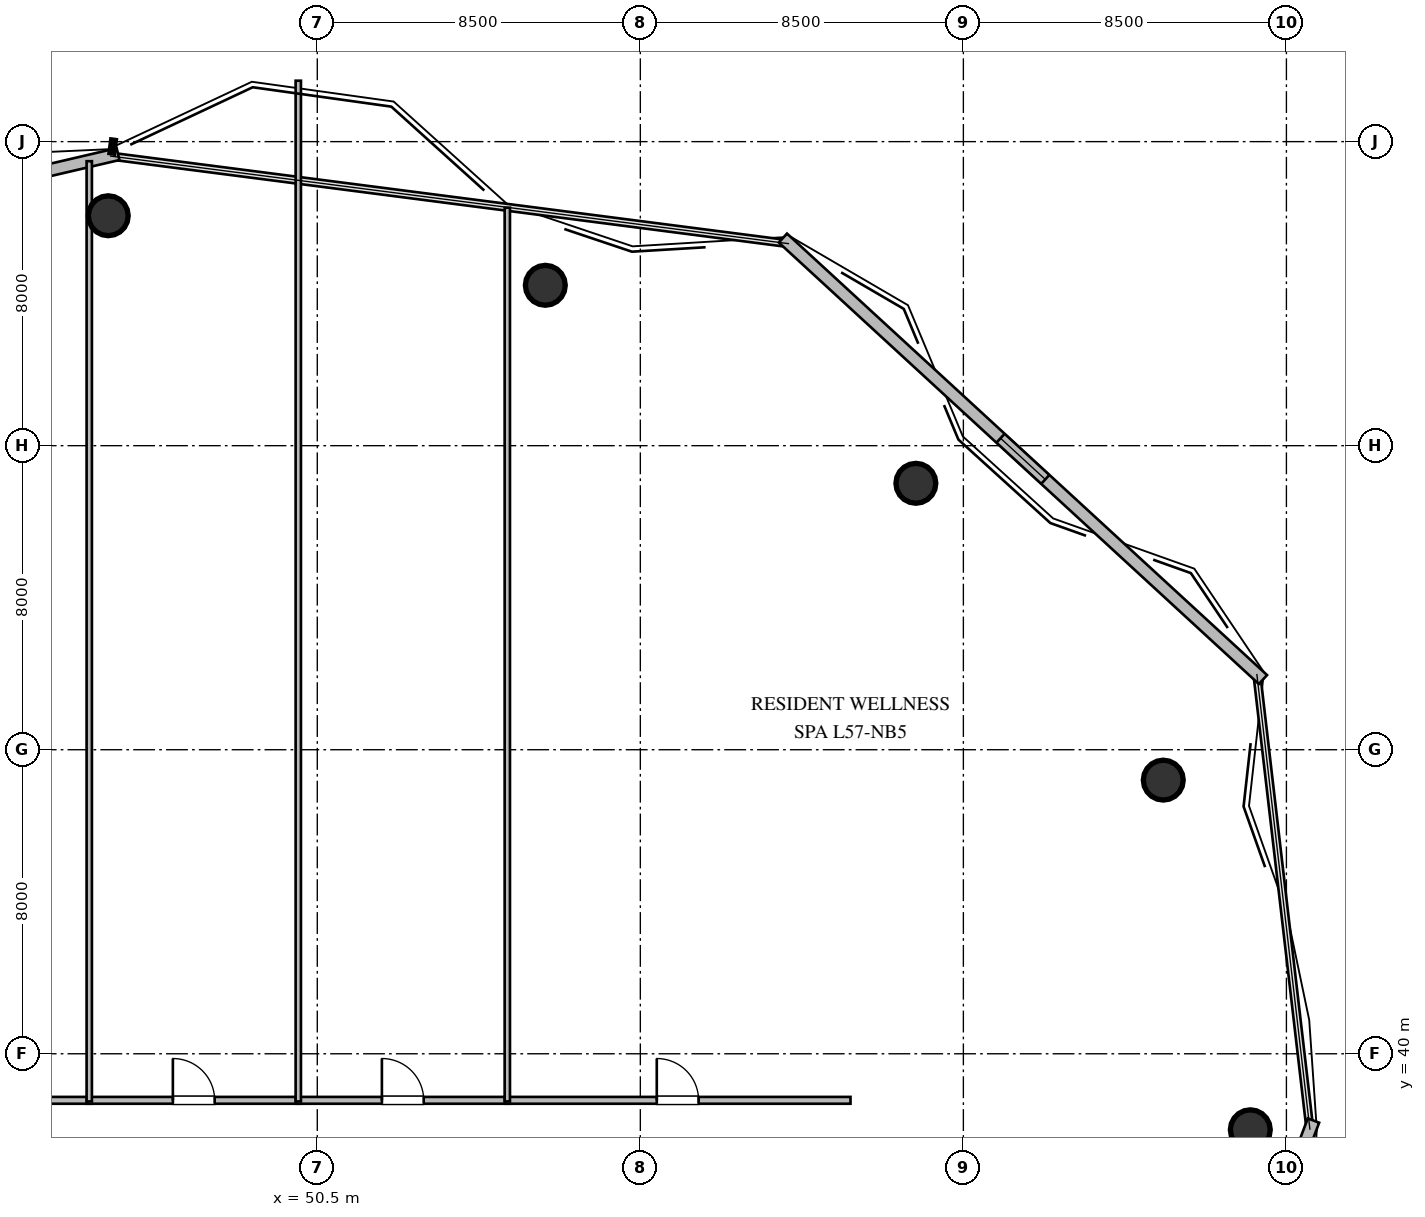
"""IFC4 building model, lengths in metres.
Left out: names, types, materials, properties, quantities, classifications, styles, units other than length and angle.
Written with IfcOpenShell. Run it as: python <this file> out.ifc"""

import sys

from ifc_helpers import new_model, si_unit, direction, frame, frame_2d, origin, origin_2d, place, context, subcontext, project, spatial, rectangle, circle, extrude, element, fill, save


model = new_model("IFC4")
c1 = context("Model", 3, precision=1e-05, world=origin(), true_north=direction((0.0, 1.0)))
c2 = subcontext(c1, "Body", "Model", "MODEL_VIEW")
j1 = project(units=[si_unit("LENGTHUNIT", "METRE"), si_unit("PLANEANGLEUNIT", "RADIAN")], contexts=[c1])
p1 = place(None, origin())
s1 = spatial("IfcSite", under=j1, at=p1, CompositionType="ELEMENT")
p2 = place(p1, origin())
s2 = spatial("IfcBuilding", under=s1, at=p2, CompositionType="ELEMENT")
p3 = place(p2, frame((0.0, 0.0, 217.2)))
s3 = spatial("IfcBuildingStorey", under=s2, at=p3, CompositionType="ELEMENT", Elevation=217.2)
for number, where, z_axis, x_axis in (
    (1, (75.05, 38.0, 0.0), (0.0, 0.0, 1.0), (1.0, 0.0, 0.0)),
    (2, (72.76, 47.2, 0.0), (0.0, 0.0, 1.0), (1.0, 0.0, 0.0)),
    (3, (66.25, 55.01, 0.0), (0.0, 0.0, 1.0), (1.0, 0.0, 0.0)),
    (4, (56.5, 60.22, 0.0), (0.0, 0.0, 1.0), (1.0, 0.0, 0.0)),
    (5, (45.0, 62.05, 0.0), (0.0, 0.0, 1.0), (1.0, 0.0, 0.0)),
):
    element("IfcColumn", number, at=place(p3, frame(where, z_axis=z_axis, x_axis=x_axis)), inside=s3, PredefinedType="COLUMN", context=c2, shape_type="SweptSolid", body=[
        extrude(circle(Radius=0.525, at=origin_2d()), origin(), (0.0, 0.0, 1.0), 3.6),
    ])
p4 = place(p3, frame((76.712, 38.243, 0.0), z_axis=(0.0, 0.0, 1.0), x_axis=(-0.353659523244, -0.935374225441, 0.0)))
e6 = element("IfcWall", 6, at=p4, inside=s3, PredefinedType="STANDARD", context=c2, shape_type="SweptSolid", body=[
    extrude(rectangle(XDim=14.172, YDim=0.32, at=frame_2d((7.086, 0.0))), origin(), (0.0, 0.0, 1.0), 3.36),
])
p5 = place(p3, frame((27.909, 59.617, 0.0), z_axis=(0.0, 0.0, 1.0), x_axis=(0.973753606594, 0.227604731158, 0.0)))
e7 = element("IfcWall", 7, at=p5, inside=s3, PredefinedType="STANDARD", context=c2, shape_type="SweptSolid", body=[
    extrude(rectangle(XDim=17.817, YDim=0.32, at=frame_2d((8.908, 0.0))), origin(), (0.0, 0.0, 1.0), 3.36),
])
p6 = place(p5, frame((8.109, 0.0, 1.05)))
e8 = element("IfcOpeningElement", 8, at=p6, cuts=e7, PredefinedType="OPENING", context=c2, shape_type="SweptSolid", body=[
    extrude(rectangle(XDim=1.6, YDim=1.5, at=frame_2d((0.8, 0.75))), frame((0.0, 0.17, 0.0), z_axis=(0.0, -1.0, 0.0), x_axis=(1.0, 0.0, 0.0)), (0.0, 0.0, 1.0), 0.34),
])
p7 = place(p3, frame((62.751, 61.463, 0.0), z_axis=(0.0, 0.0, 1.0), x_axis=(0.736063690764, -0.676912286149, 0.0)))
e9 = element("IfcWall", 9, at=p7, inside=s3, PredefinedType="STANDARD", context=c2, shape_type="SweptSolid", body=[
    extrude(rectangle(XDim=17.162, YDim=0.32, at=frame_2d((8.581, 0.0))), origin(), (0.0, 0.0, 1.0), 3.36),
])
p8 = place(p7, frame((7.781, 0.0, 1.05)))
e10 = element("IfcOpeningElement", 10, at=p8, cuts=e9, PredefinedType="OPENING", context=c2, shape_type="SweptSolid", body=[
    extrude(rectangle(XDim=1.6, YDim=1.5, at=frame_2d((0.8, 0.75))), frame((0.0, 0.17, 0.0), z_axis=(0.0, -1.0, 0.0), x_axis=(1.0, 0.0, 0.0)), (0.0, 0.0, 1.0), 0.34),
])
p9 = place(p3, frame((39.185, 38.775, 0.0), z_axis=(0.0, 0.0, 1.0), x_axis=(1.0, 0.0, 0.0)))
e11 = element("IfcWall", 11, at=p9, inside=s3, PredefinedType="PARTITIONING", context=c2, shape_type="SweptSolid", body=[
    extrude(rectangle(XDim=5.38, YDim=0.18, at=frame_2d((2.69, 0.0))), origin(), (0.0, 0.0, 1.0), 3.36),
])
p10 = place(p9, frame((2.14, 0.0, 0.0)))
e12 = element("IfcOpeningElement", 12, at=p10, cuts=e11, PredefinedType="OPENING", context=c2, shape_type="SweptSolid", body=[
    extrude(rectangle(XDim=1.1, YDim=2.1, at=frame_2d((0.55, 1.05))), frame((0.0, 0.1, 0.0), z_axis=(0.0, -1.0, 0.0), x_axis=(1.0, 0.0, 0.0)), (0.0, 0.0, 1.0), 0.2),
])
p11 = place(p3, frame((44.435, 38.775, 0.0), z_axis=(0.0, 0.0, 1.0), x_axis=(1.0, 0.0, 0.0)))
e13 = element("IfcWall", 13, at=p11, inside=s3, PredefinedType="PARTITIONING", context=c2, shape_type="SweptSolid", body=[
    extrude(rectangle(XDim=5.63, YDim=0.18, at=frame_2d((2.815, 0.0))), origin(), (0.0, 0.0, 1.0), 3.36),
])
p12 = place(p11, frame((2.265, 0.0, 0.0)))
e14 = element("IfcOpeningElement", 14, at=p12, cuts=e13, PredefinedType="OPENING", context=c2, shape_type="SweptSolid", body=[
    extrude(rectangle(XDim=1.1, YDim=2.1, at=frame_2d((0.55, 1.05))), frame((0.0, 0.1, 0.0), z_axis=(0.0, -1.0, 0.0), x_axis=(1.0, 0.0, 0.0)), (0.0, 0.0, 1.0), 0.2),
])
p13 = place(p3, frame((49.935, 38.775, 0.0), z_axis=(0.0, 0.0, 1.0), x_axis=(1.0, 0.0, 0.0)))
e15 = element("IfcWall", 15, at=p13, inside=s3, PredefinedType="PARTITIONING", context=c2, shape_type="SweptSolid", body=[
    extrude(rectangle(XDim=5.63, YDim=0.18, at=frame_2d((2.815, 0.0))), origin(), (0.0, 0.0, 1.0), 3.36),
])
p14 = place(p13, frame((2.265, 0.0, 0.0)))
e16 = element("IfcOpeningElement", 16, at=p14, cuts=e15, PredefinedType="OPENING", context=c2, shape_type="SweptSolid", body=[
    extrude(rectangle(XDim=1.1, YDim=2.1, at=frame_2d((0.55, 1.05))), frame((0.0, 0.1, 0.0), z_axis=(0.0, -1.0, 0.0), x_axis=(1.0, 0.0, 0.0)), (0.0, 0.0, 1.0), 0.2),
])
p15 = place(p3, frame((55.435, 38.775, 0.0), z_axis=(0.0, 0.0, 1.0), x_axis=(1.0, 0.0, 0.0)))
e17 = element("IfcWall", 17, at=p15, inside=s3, PredefinedType="PARTITIONING", context=c2, shape_type="SweptSolid", body=[
    extrude(rectangle(XDim=9.095, YDim=0.18, at=frame_2d((4.547, 0.0))), origin(), (0.0, 0.0, 1.0), 3.36),
])
p16 = place(p15, frame((3.998, 0.0, 0.0)))
e18 = element("IfcOpeningElement", 18, at=p16, cuts=e17, PredefinedType="OPENING", context=c2, shape_type="SweptSolid", body=[
    extrude(rectangle(XDim=1.1, YDim=2.1, at=frame_2d((0.55, 1.05))), frame((0.0, 0.1, 0.0), z_axis=(0.0, -1.0, 0.0), x_axis=(1.0, 0.0, 0.0)), (0.0, 0.0, 1.0), 0.2),
])
p17 = place(p3, frame((44.5, 63.485, 0.0), z_axis=(0.0, 0.0, 1.0), x_axis=(0.0, -1.0, 0.0)))
e19 = element("IfcWall", 19, at=p17, inside=s3, PredefinedType="PARTITIONING", context=c2, shape_type="SweptSolid", body=[
    extrude(rectangle(XDim=24.74, YDim=0.14, at=frame_2d((12.37, 0.0))), origin(), (0.0, 0.0, 1.0), 2.89),
])
p18 = place(p3, frame((50.0, 65.603, 0.0), z_axis=(0.0, 0.0, 1.0), x_axis=(0.0, -1.0, 0.0)))
e20 = element("IfcWall", 20, at=p18, inside=s3, PredefinedType="PARTITIONING", context=c2, shape_type="SweptSolid", body=[
    extrude(rectangle(XDim=26.858, YDim=0.14, at=frame_2d((13.429, 0.0))), origin(), (0.0, 0.0, 1.0), 3.36),
])
p19 = place(p3, frame((55.5, 62.261, 0.0), z_axis=(0.0, 0.0, 1.0), x_axis=(0.0, -1.0, 0.0)))
e21 = element("IfcWall", 21, at=p19, inside=s3, PredefinedType="PARTITIONING", context=c2, shape_type="SweptSolid", body=[
    extrude(rectangle(XDim=23.516, YDim=0.14, at=frame_2d((11.758, 0.0))), origin(), (0.0, 0.0, 1.0), 3.36),
])
p20 = place(p8, origin())
e22 = element("IfcWindow", 22, at=p20, inside=s3, PartitioningType="SINGLE_PANEL", PredefinedType="WINDOW", context=c2, shape_type="SweptSolid", body=[
    extrude(rectangle(XDim=1.6, YDim=1.5, at=frame_2d((0.8, 0.75))), frame((0.0, 0.03, 0.0), z_axis=(0.0, -1.0, 0.0), x_axis=(1.0, 0.0, 0.0)), (0.0, 0.0, 1.0), 0.06),
])
fill(e10, e22)
p21 = place(p12, origin())
e23 = element("IfcDoor", 23, at=p21, inside=s3, OperationType="SINGLE_SWING_LEFT", PredefinedType="DOOR", context=c2, shape_type="SweptSolid", body=[
    extrude(rectangle(XDim=1.1, YDim=2.1, at=frame_2d((0.55, 1.05))), frame((0.0, 0.025, 0.0), z_axis=(0.0, -1.0, 0.0), x_axis=(1.0, 0.0, 0.0)), (0.0, 0.0, 1.0), 0.05),
])
fill(e14, e23)
p22 = place(p14, origin())
e24 = element("IfcDoor", 24, at=p22, inside=s3, OperationType="SINGLE_SWING_LEFT", PredefinedType="DOOR", context=c2, shape_type="SweptSolid", body=[
    extrude(rectangle(XDim=1.1, YDim=2.1, at=frame_2d((0.55, 1.05))), frame((0.0, 0.025, 0.0), z_axis=(0.0, -1.0, 0.0), x_axis=(1.0, 0.0, 0.0)), (0.0, 0.0, 1.0), 0.05),
])
fill(e16, e24)
p23 = place(p16, origin())
e25 = element("IfcDoor", 25, at=p23, inside=s3, OperationType="SINGLE_SWING_LEFT", PredefinedType="DOOR", context=c2, shape_type="SweptSolid", body=[
    extrude(rectangle(XDim=1.1, YDim=2.1, at=frame_2d((0.55, 1.05))), frame((0.0, 0.025, 0.0), z_axis=(0.0, -1.0, 0.0), x_axis=(1.0, 0.0, 0.0)), (0.0, 0.0, 1.0), 0.05),
])
fill(e18, e25)
save(model, sys.argv[1])
